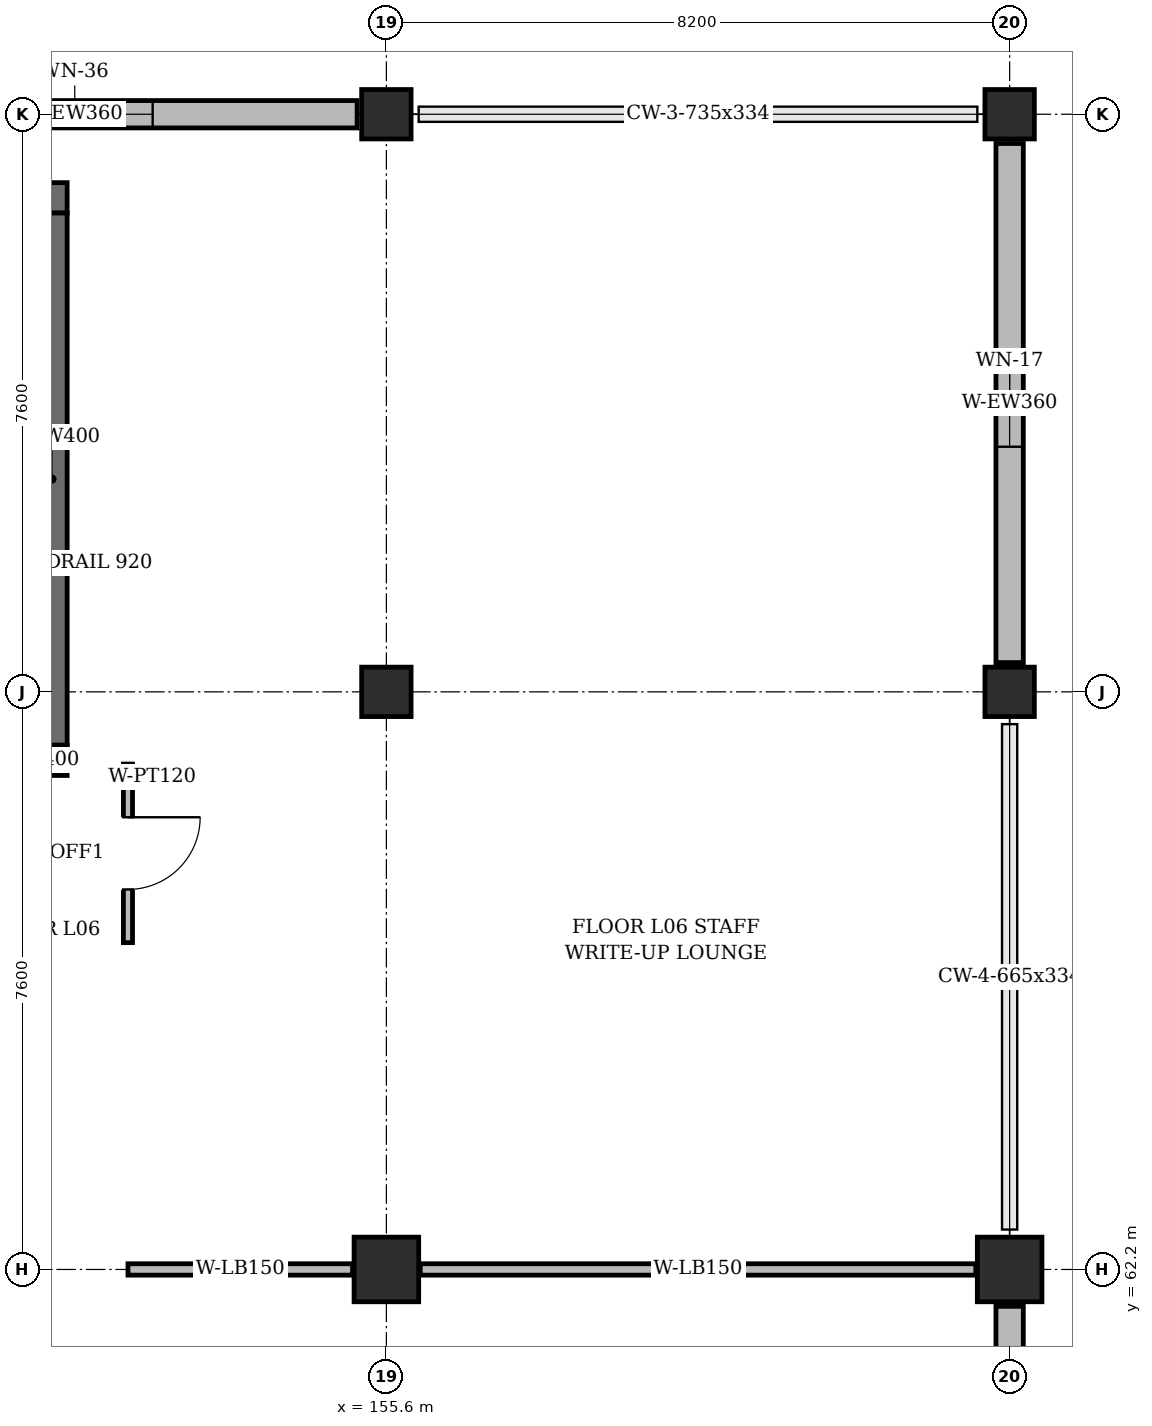
"""IFC4 building model, lengths in metres.
Left out: names, types, materials, properties, quantities, classifications, styles, units other than length and angle.
Written with IfcOpenShell. Run it as: python <this file> out.ifc"""

import sys

from ifc_helpers import new_model, si_unit, direction, frame, frame_2d, origin, origin_2d, place, context, subcontext, project, spatial, rectangle, extrude, element, fill, save


model = new_model("IFC4")
c1 = context("Model", 3, precision=1e-05, world=origin(), true_north=direction((0.0, 1.0)))
c2 = subcontext(c1, "Body", "Model", "MODEL_VIEW")
j1 = project(units=[si_unit("LENGTHUNIT", "METRE"), si_unit("PLANEANGLEUNIT", "RADIAN")], contexts=[c1])
p1 = place(None, origin())
s1 = spatial("IfcSite", under=j1, at=p1, CompositionType="ELEMENT")
p2 = place(p1, origin())
s2 = spatial("IfcBuilding", under=s1, at=p2, CompositionType="ELEMENT")
p3 = place(p2, frame((0.0, 0.0, 28.2)))
s3 = spatial("IfcBuildingStorey", under=s2, at=p3, CompositionType="ELEMENT", Elevation=28.2)
p4 = place(p3, frame((155.6, 62.2, 0.0), z_axis=(0.0, 0.0, 1.0), x_axis=(1.0, 0.0, 0.0)))
e1 = element("IfcColumn", 1, at=p4, inside=s3, PredefinedType="COLUMN", context=c2, shape_type="SweptSolid", body=[
    extrude(rectangle(XDim=0.85, YDim=0.85, at=origin_2d()), origin(), (0.0, 0.0, 1.0), 3.94),
])
for number, where, z_axis, x_axis in (
    (2, (155.6, 69.8, 0.0), (0.0, 0.0, 1.0), (1.0, 0.0, 0.0)),
    (3, (155.6, 77.4, 0.0), (0.0, 0.0, 1.0), (1.0, 0.0, 0.0)),
):
    element("IfcColumn", number, at=place(p3, frame(where, z_axis=z_axis, x_axis=x_axis)), inside=s3, PredefinedType="COLUMN", context=c2, shape_type="SweptSolid", body=[
        extrude(rectangle(XDim=0.65, YDim=0.65, at=origin_2d()), origin(), (0.0, 0.0, 1.0), 3.94),
    ])
p5 = place(p3, frame((163.8, 62.2, 0.0), z_axis=(0.0, 0.0, 1.0), x_axis=(1.0, 0.0, 0.0)))
e4 = element("IfcColumn", 4, at=p5, inside=s3, PredefinedType="COLUMN", context=c2, shape_type="SweptSolid", body=[
    extrude(rectangle(XDim=0.85, YDim=0.85, at=origin_2d()), origin(), (0.0, 0.0, 1.0), 3.94),
])
for number, where, z_axis, x_axis in (
    (5, (163.8, 69.8, 0.0), (0.0, 0.0, 1.0), (1.0, 0.0, 0.0)),
    (6, (163.8, 77.4, 0.0), (0.0, 0.0, 1.0), (1.0, 0.0, 0.0)),
):
    element("IfcColumn", number, at=place(p3, frame(where, z_axis=z_axis, x_axis=x_axis)), inside=s3, PredefinedType="COLUMN", context=c2, shape_type="SweptSolid", body=[
        extrude(rectangle(XDim=0.65, YDim=0.65, at=origin_2d()), origin(), (0.0, 0.0, 1.0), 3.94),
    ])
p6 = place(p3, frame((163.8, 55.085, 0.0), z_axis=(0.0, 0.0, 1.0), x_axis=(0.0, 1.0, 0.0)))
e7 = element("IfcWall", 7, at=p6, inside=s3, PredefinedType="SOLIDWALL", context=c2, shape_type="SweptSolid", body=[
    extrude(rectangle(XDim=6.63, YDim=0.36, at=frame_2d((3.315, 0.0))), origin(), (0.0, 0.0, 1.0), 3.325),
])
p7 = place(p6, frame((2.94, 0.0, 0.95)))
e8 = element("IfcOpeningElement", 8, at=p7, cuts=e7, PredefinedType="OPENING", context=c2, shape_type="SweptSolid", body=[
    extrude(rectangle(XDim=0.75, YDim=1.8, at=frame_2d((0.375, 0.9))), frame((0.0, 0.192, 0.0), z_axis=(0.0, -1.0, 0.0), x_axis=(1.0, 0.0, 0.0)), (0.0, 0.0, 1.0), 0.384),
])
p8 = place(p3, frame((163.8, 70.185, 0.0), z_axis=(0.0, 0.0, 1.0), x_axis=(0.0, 1.0, 0.0)))
e9 = element("IfcWall", 9, at=p8, inside=s3, PredefinedType="SOLIDWALL", context=c2, shape_type="SweptSolid", body=[
    extrude(rectangle(XDim=6.83, YDim=0.36, at=frame_2d((3.415, 0.0))), origin(), (0.0, 0.0, 1.0), 3.325),
])
p9 = place(p8, frame((2.84, 0.0, 0.95)))
e10 = element("IfcOpeningElement", 10, at=p9, cuts=e9, PredefinedType="OPENING", context=c2, shape_type="SweptSolid", body=[
    extrude(rectangle(XDim=1.15, YDim=1.25, at=frame_2d((0.575, 0.625))), frame((0.0, 0.192, 0.0), z_axis=(0.0, -1.0, 0.0), x_axis=(1.0, 0.0, 0.0)), (0.0, 0.0, 1.0), 0.384),
])
p10 = place(p3, frame((155.215, 77.4, 0.0), z_axis=(0.0, 0.0, 1.0), x_axis=(-1.0, 0.0, 0.0)))
e11 = element("IfcWall", 11, at=p10, inside=s3, PredefinedType="SOLIDWALL", context=c2, shape_type="SweptSolid", body=[
    extrude(rectangle(XDim=7.43, YDim=0.36, at=frame_2d((3.715, 0.0))), origin(), (0.0, 0.0, 1.0), 3.325),
])
p11 = place(p10, frame((2.69, 0.0, 0.95)))
e12 = element("IfcOpeningElement", 12, at=p11, cuts=e11, PredefinedType="OPENING", context=c2, shape_type="SweptSolid", body=[
    extrude(rectangle(XDim=2.05, YDim=2.05, at=frame_2d((1.025, 1.025))), frame((0.0, 0.192, 0.0), z_axis=(0.0, -1.0, 0.0), x_axis=(1.0, 0.0, 0.0)), (0.0, 0.0, 1.0), 0.384),
])
p12 = place(p3, frame((147.6, 68.9, 0.0), z_axis=(0.0, 0.0, 1.0), x_axis=(1.0, 0.0, 0.0)))
e13 = element("IfcWall", 13, at=p12, inside=s3, PredefinedType="SHEAR", context=c2, shape_type="SweptSolid", body=[
    extrude(rectangle(XDim=3.8, YDim=0.4, at=frame_2d((1.9, 0.0))), origin(), (0.0, 0.0, 1.0), 3.94),
])
p13 = place(p12, frame((1.3, 0.0, 0.0)))
e14 = element("IfcOpeningElement", 14, at=p13, cuts=e13, PredefinedType="OPENING", context=c2, shape_type="SweptSolid", body=[
    extrude(rectangle(XDim=1.2, YDim=2.2, at=frame_2d((0.6, 1.1))), frame((0.0, 0.212, 0.0), z_axis=(0.0, -1.0, 0.0), x_axis=(1.0, 0.0, 0.0)), (0.0, 0.0, 1.0), 0.424),
])
p14 = place(p3, frame((147.6, 76.3, 0.0), z_axis=(0.0, 0.0, 1.0), x_axis=(1.0, 0.0, 0.0)))
e15 = element("IfcWall", 15, at=p14, inside=s3, PredefinedType="SHEAR", context=c2, shape_type="SweptSolid", body=[
    extrude(rectangle(XDim=3.8, YDim=0.4, at=frame_2d((1.9, 0.0))), origin(), (0.0, 0.0, 1.0), 3.94),
])
p15 = place(p3, frame((151.2, 69.1, 0.0), z_axis=(0.0, 0.0, 1.0), x_axis=(0.0, 1.0, 0.0)))
e16 = element("IfcWall", 16, at=p15, inside=s3, PredefinedType="SHEAR", context=c2, shape_type="SweptSolid", body=[
    extrude(rectangle(XDim=7.0, YDim=0.4, at=frame_2d((3.5, 0.0))), origin(), (0.0, 0.0, 1.0), 3.94),
])
p16 = place(p3, frame((152.2, 68.85, 0.0), z_axis=(0.0, 0.0, 1.0), x_axis=(0.0, -1.0, 0.0)))
e17 = element("IfcWall", 17, at=p16, inside=s3, PredefinedType="PARTITIONING", context=c2, shape_type="SweptSolid", body=[
    extrude(rectangle(XDim=2.35, YDim=0.12, at=frame_2d((1.175, 0.0))), origin(), (0.0, 0.0, 1.0), 3.805),
])
p17 = place(p16, frame((0.7, 0.0, 0.0)))
e18 = element("IfcOpeningElement", 18, at=p17, cuts=e17, PredefinedType="OPENING", context=c2, shape_type="SweptSolid", body=[
    extrude(rectangle(XDim=0.95, YDim=2.2, at=frame_2d((0.475, 1.1))), frame((0.0, 0.072, 0.0), z_axis=(0.0, -1.0, 0.0), x_axis=(1.0, 0.0, 0.0)), (0.0, 0.0, 1.0), 0.144),
])
p18 = place(p3, frame((152.2, 62.2, 0.0), z_axis=(0.0, 0.0, 1.0), x_axis=(1.0, 0.0, 0.0)))
e19 = element("IfcWall", 19, at=p18, inside=s3, PredefinedType="PARTITIONING", context=c2, shape_type="SweptSolid", body=[
    extrude(rectangle(XDim=2.955, YDim=0.15, at=frame_2d((1.478, 0.0))), origin(), (0.0, 0.0, 1.0), 3.275),
])
p19 = place(p3, frame((156.045, 62.2, 0.0), z_axis=(0.0, 0.0, 1.0), x_axis=(1.0, 0.0, 0.0)))
e20 = element("IfcWall", 20, at=p19, inside=s3, PredefinedType="PARTITIONING", context=c2, shape_type="SweptSolid", body=[
    extrude(rectangle(XDim=7.31, YDim=0.15, at=frame_2d((3.655, 0.0))), origin(), (0.0, 0.0, 1.0), 3.275),
])
p20 = place(p9, origin())
e21 = element("IfcWindow", 21, at=p20, inside=s3, PartitioningType="SINGLE_PANEL", PredefinedType="WINDOW", context=c2, shape_type="SweptSolid", body=[
    extrude(rectangle(XDim=1.15, YDim=1.25, at=frame_2d((0.575, 0.625))), frame((0.0, 0.03, 0.0), z_axis=(0.0, -1.0, 0.0), x_axis=(1.0, 0.0, 0.0)), (0.0, 0.0, 1.0), 0.06),
])
fill(e10, e21)
p21 = place(p11, origin())
e22 = element("IfcWindow", 22, at=p21, inside=s3, PartitioningType="DOUBLE_PANEL_VERTICAL", PredefinedType="WINDOW", context=c2, shape_type="SweptSolid", body=[
    extrude(rectangle(XDim=2.05, YDim=2.05, at=frame_2d((1.025, 1.025))), frame((0.0, 0.03, 0.0), z_axis=(0.0, -1.0, 0.0), x_axis=(1.0, 0.0, 0.0)), (0.0, 0.0, 1.0), 0.06),
])
fill(e12, e22)
p22 = place(p17, origin())
e23 = element("IfcDoor", 23, at=p22, inside=s3, OperationType="SINGLE_SWING_LEFT", PredefinedType="DOOR", context=c2, shape_type="SweptSolid", body=[
    extrude(rectangle(XDim=0.95, YDim=2.2, at=frame_2d((0.475, 1.1))), frame((0.0, 0.025, 0.0), z_axis=(0.0, -1.0, 0.0), x_axis=(1.0, 0.0, 0.0)), (0.0, 0.0, 1.0), 0.05),
])
fill(e18, e23)
save(model, sys.argv[1])
